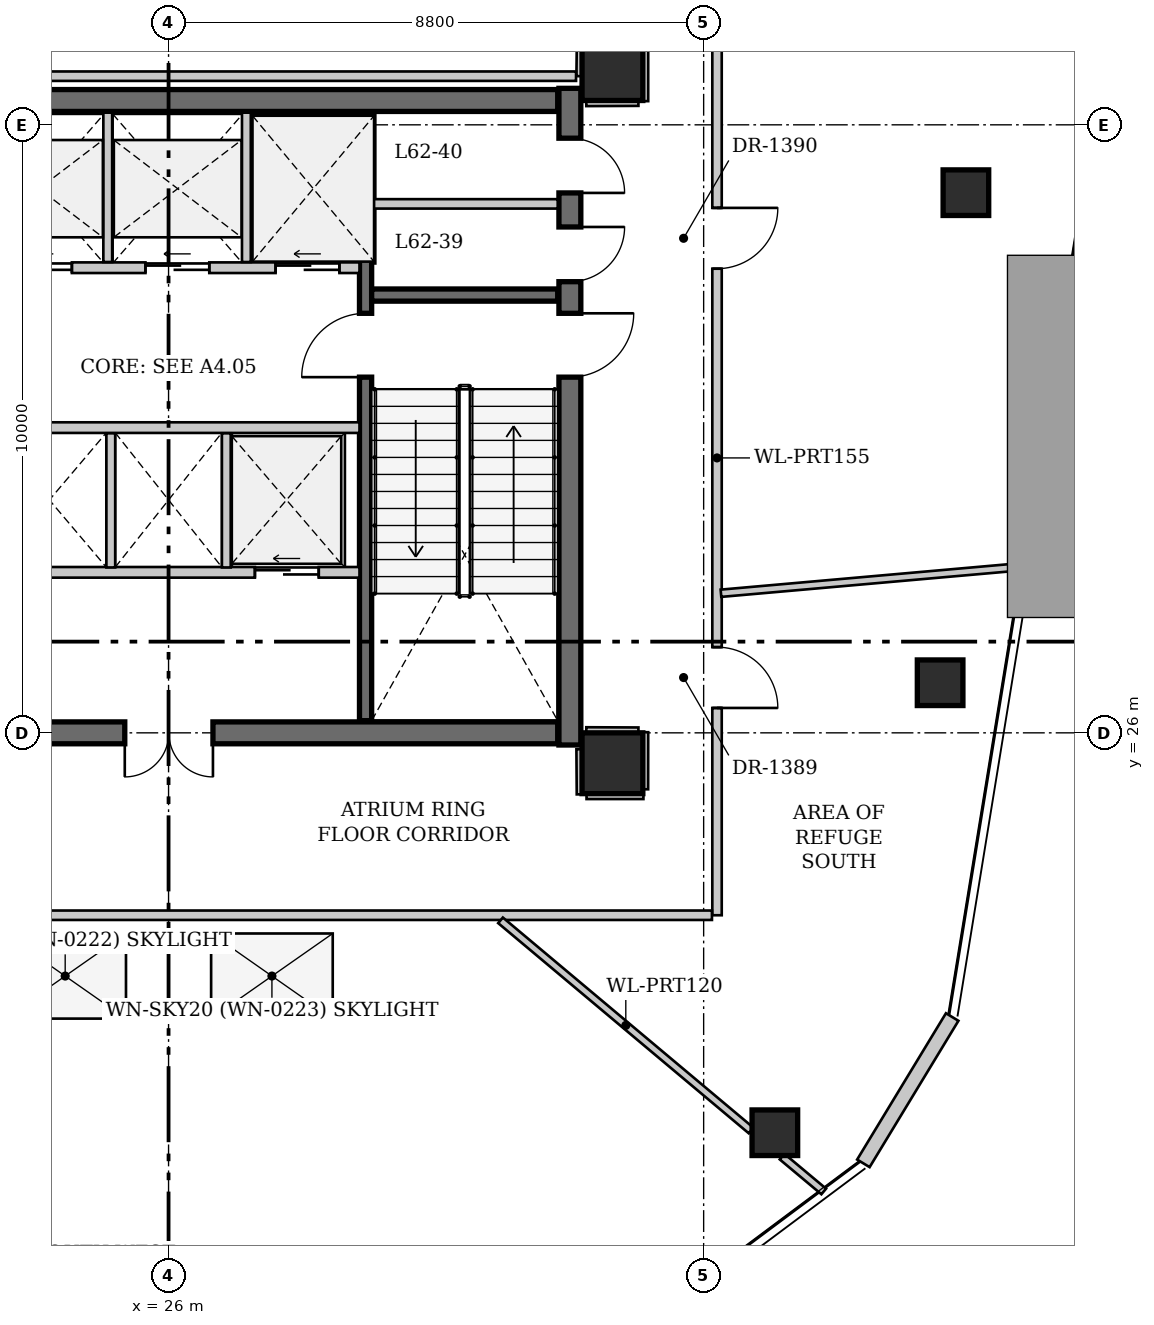
"""IFC4 building model, lengths in metres.
Left out: names, types, materials, properties, quantities, classifications, styles, units other than length and angle.
Written with IfcOpenShell. Run it as: python <this file> out.ifc"""

import sys

from ifc_helpers import new_model, si_unit, direction, frame, frame_2d, origin, origin_2d, place, context, subcontext, project, spatial, rectangle, hollow_rectangle, extrude, source, transform, mapped, element, fill, save


model = new_model("IFC4")
c1 = context("Model", 3, precision=1e-05, world=origin(), true_north=direction((0.0, 1.0)))
c2 = subcontext(c1, "Body", "Model", "MODEL_VIEW")
j1 = project(units=[si_unit("LENGTHUNIT", "METRE"), si_unit("PLANEANGLEUNIT", "RADIAN")], contexts=[c1])
p1 = place(None, origin())
s1 = spatial("IfcSite", under=j1, at=p1, CompositionType="ELEMENT")
p2 = place(p1, origin())
s2 = spatial("IfcBuilding", under=s1, at=p2, CompositionType="ELEMENT")
p3 = place(p2, frame((0.0, 0.0, 236.2)))
s3 = spatial("IfcBuildingStorey", under=s2, at=p3, CompositionType="ELEMENT", Elevation=236.2)
for number, where, z_axis, x_axis in (
    (1, (39.113, 34.884, 0.0), (0.0, 0.0, 1.0), (1.0, 0.0, 0.0)),
    (2, (38.689, 26.824, 0.0), (0.0, 0.0, 1.0), (1.0, 0.0, 0.0)),
    (3, (35.971, 19.423, 0.0), (0.0, 0.0, 1.0), (1.0, 0.0, 0.0)),
):
    element("IfcColumn", number, at=place(p3, frame(where, z_axis=z_axis, x_axis=x_axis)), inside=s3, PredefinedType="COLUMN", context=c2, shape_type="SweptSolid", body=[
        extrude(hollow_rectangle(XDim=0.75, YDim=0.75, WallThickness=0.04, at=origin_2d()), origin(), (0.0, 0.0, 1.0), 4.15),
    ])
for number, where, z_axis, x_axis in (
    (4, (33.3, 25.5, 0.0), (0.0, 0.0, 1.0), (1.0, 0.0, 0.0)),
    (5, (33.3, 36.9, 0.0), (0.0, 0.0, 1.0), (1.0, 0.0, 0.0)),
):
    element("IfcColumn", number, at=place(p3, frame(where, z_axis=z_axis, x_axis=x_axis)), inside=s3, PredefinedType="COLUMN", context=c2, shape_type="SweptSolid", body=[
        extrude(rectangle(XDim=1.0, YDim=1.0, at=origin_2d()), origin(), (0.0, 0.0, 1.0), 4.15),
    ])
p4 = place(p3, frame((38.887, 21.326, 0.0), z_axis=(0.0, 0.0, 1.0), x_axis=(-0.518774446732, -0.854911149429, 0.0)))
e6 = element("IfcWall", 6, at=p4, inside=s3, PredefinedType="SOLIDWALL", context=c2, shape_type="SweptSolid", body=[
    extrude(rectangle(XDim=2.815, YDim=0.24, at=frame_2d((1.408, 0.0))), origin(), (0.0, 0.0, 1.0), 4.15),
])
p5 = place(p3, frame((32.6, 36.6, 0.0), z_axis=(0.0, 0.0, 1.0), x_axis=(0.0, -1.0, 0.0)))
e7 = element("IfcWall", 7, at=p5, inside=s3, PredefinedType="SHEAR", context=c2, shape_type="SweptSolid", body=[
    extrude(rectangle(XDim=10.8, YDim=0.36, at=frame_2d((5.4, 0.0))), origin(), (0.0, 0.0, 1.0), 4.6),
])
p6 = place(p5, frame((3.7, 0.0, 0.0)))
e8 = element("IfcOpeningElement", 8, at=p6, cuts=e7, PredefinedType="OPENING", context=c2, shape_type="SweptSolid", body=[
    extrude(rectangle(XDim=1.05, YDim=2.15, at=frame_2d((0.525, 1.075))), frame((0.0, 0.19, 0.0), z_axis=(0.0, -1.0, 0.0), x_axis=(1.0, 0.0, 0.0)), (0.0, 0.0, 1.0), 0.38),
])
p7 = place(p5, frame((2.28, 0.0, 0.0)))
e9 = element("IfcOpeningElement", 9, at=p7, cuts=e7, PredefinedType="OPENING", context=c2, shape_type="SweptSolid", body=[
    extrude(rectangle(XDim=0.9, YDim=2.1, at=frame_2d((0.45, 1.05))), frame((0.0, 0.19, 0.0), z_axis=(0.0, -1.0, 0.0), x_axis=(1.0, 0.0, 0.0)), (0.0, 0.0, 1.0), 0.38),
])
p8 = place(p5, frame((0.82, 0.0, 0.0)))
e10 = element("IfcOpeningElement", 10, at=p8, cuts=e7, PredefinedType="OPENING", context=c2, shape_type="SweptSolid", body=[
    extrude(rectangle(XDim=0.9, YDim=2.1, at=frame_2d((0.45, 1.05))), frame((0.0, 0.19, 0.0), z_axis=(0.0, -1.0, 0.0), x_axis=(1.0, 0.0, 0.0)), (0.0, 0.0, 1.0), 0.38),
])
p9 = place(p3, frame((19.6, 36.4, 0.0), z_axis=(0.0, 0.0, 1.0), x_axis=(1.0, 0.0, 0.0)))
e11 = element("IfcWall", 11, at=p9, inside=s3, PredefinedType="SHEAR", context=c2, shape_type="SweptSolid", body=[
    extrude(rectangle(XDim=12.8, YDim=0.36, at=frame_2d((6.4, 0.0))), origin(), (0.0, 0.0, 1.0), 4.6),
])
p10 = place(p3, frame((32.4, 26.0, 0.0), z_axis=(0.0, 0.0, 1.0), x_axis=(-1.0, 0.0, 0.0)))
e12 = element("IfcWall", 12, at=p10, inside=s3, PredefinedType="SHEAR", context=c2, shape_type="SweptSolid", body=[
    extrude(rectangle(XDim=12.8, YDim=0.36, at=frame_2d((6.4, 0.0))), origin(), (0.0, 0.0, 1.0), 4.6),
])
p11 = place(p10, frame((10.75, 0.0, 0.0)))
e13 = element("IfcOpeningElement", 13, at=p11, cuts=e12, PredefinedType="OPENING", context=c2, shape_type="SweptSolid", body=[
    extrude(rectangle(XDim=1.05, YDim=2.15, at=frame_2d((0.525, 1.075))), frame((0.0, 0.19, 0.0), z_axis=(0.0, -1.0, 0.0), x_axis=(1.0, 0.0, 0.0)), (0.0, 0.0, 1.0), 0.38),
])
p12 = place(p10, frame((5.67, 0.0, 0.0)))
e14 = element("IfcOpeningElement", 14, at=p12, cuts=e12, PredefinedType="OPENING", context=c2, shape_type="SweptSolid", body=[
    extrude(rectangle(XDim=1.45, YDim=2.2, at=frame_2d((0.725, 1.1))), frame((0.0, 0.19, 0.0), z_axis=(0.0, -1.0, 0.0), x_axis=(1.0, 0.0, 0.0)), (0.0, 0.0, 1.0), 0.38),
])
p13 = place(p3, frame((29.24, 26.2, 0.0), z_axis=(0.0, 0.0, 1.0), x_axis=(0.0, 1.0, 0.0)))
e15 = element("IfcWall", 15, at=p13, inside=s3, PredefinedType="SHEAR", context=c2, shape_type="SweptSolid", body=[
    extrude(rectangle(XDim=10.0, YDim=0.2, at=frame_2d((5.0, 0.0))), origin(), (0.0, 0.0, 1.0), 4.6),
])
p14 = place(p13, frame((5.65, 0.0, 0.0)))
e16 = element("IfcOpeningElement", 16, at=p14, cuts=e15, PredefinedType="OPENING", context=c2, shape_type="SweptSolid", body=[
    extrude(rectangle(XDim=1.05, YDim=2.15, at=frame_2d((0.525, 1.075))), frame((0.0, 0.11, 0.0), z_axis=(0.0, -1.0, 0.0), x_axis=(1.0, 0.0, 0.0)), (0.0, 0.0, 1.0), 0.22),
])
p15 = place(p3, frame((29.34, 33.2, 0.0), z_axis=(0.0, 0.0, 1.0), x_axis=(1.0, 0.0, 0.0)))
e17 = element("IfcWall", 17, at=p15, inside=s3, PredefinedType="SHEAR", context=c2, shape_type="SweptSolid", body=[
    extrude(rectangle(XDim=3.06, YDim=0.2, at=frame_2d((1.53, 0.0))), origin(), (0.0, 0.0, 1.0), 4.6),
])
p16 = place(p3, frame((22.86, 33.65, 0.0), z_axis=(0.0, 0.0, 1.0), x_axis=(1.0, 0.0, 0.0)))
e18 = element("IfcWall", 18, at=p16, inside=s3, PredefinedType="SOLIDWALL", context=c2, shape_type="SweptSolid", body=[
    extrude(rectangle(XDim=6.28, YDim=0.175, at=frame_2d((3.14, 0.0))), origin(), (0.0, 0.0, 1.0), 4.15),
])
p17 = place(p16, frame((0.5, 0.0, 0.0)))
e19 = element("IfcOpeningElement", 19, at=p17, cuts=e18, PredefinedType="OPENING", context=c2, shape_type="SweptSolid", body=[
    extrude(rectangle(XDim=1.05, YDim=2.15, at=frame_2d((0.525, 1.075))), frame((0.0, 0.098, 0.0), z_axis=(0.0, -1.0, 0.0), x_axis=(1.0, 0.0, 0.0)), (0.0, 0.0, 1.0), 0.195),
])
p18 = place(p16, frame((2.76, 0.0, 0.0)))
e20 = element("IfcOpeningElement", 20, at=p18, cuts=e18, PredefinedType="OPENING", context=c2, shape_type="SweptSolid", body=[
    extrude(rectangle(XDim=1.05, YDim=2.15, at=frame_2d((0.525, 1.075))), frame((0.0, 0.098, 0.0), z_axis=(0.0, -1.0, 0.0), x_axis=(1.0, 0.0, 0.0)), (0.0, 0.0, 1.0), 0.195),
])
p19 = place(p16, frame((4.9, 0.0, 0.0)))
e21 = element("IfcOpeningElement", 21, at=p19, cuts=e18, PredefinedType="OPENING", context=c2, shape_type="SweptSolid", body=[
    extrude(rectangle(XDim=1.05, YDim=2.15, at=frame_2d((0.525, 1.075))), frame((0.0, 0.098, 0.0), z_axis=(0.0, -1.0, 0.0), x_axis=(1.0, 0.0, 0.0)), (0.0, 0.0, 1.0), 0.195),
])
for number, where, z_axis, x_axis in (
    (22, (25.0, 33.743, 0.0), (0.0, 0.0, 1.0), (0.0, 1.0, 0.0)),
    (23, (27.28, 33.743, 0.0), (0.0, 0.0, 1.0), (0.0, 1.0, 0.0)),
):
    element("IfcWall", number, at=place(p3, frame(where, z_axis=z_axis, x_axis=x_axis)), inside=s3, PredefinedType="SOLIDWALL", context=c2, shape_type="SweptSolid", body=[
        extrude(rectangle(XDim=2.457, YDim=0.145, at=frame_2d((1.228, 0.0))), origin(), (0.0, 0.0, 1.0), 4.15),
    ])
p20 = place(p3, frame((22.86, 31.02, 0.0), z_axis=(0.0, 0.0, 1.0), x_axis=(1.0, 0.0, 0.0)))
e24 = element("IfcWall", 24, at=p20, inside=s3, PredefinedType="SOLIDWALL", context=c2, shape_type="SweptSolid", body=[
    extrude(rectangle(XDim=6.28, YDim=0.175, at=frame_2d((3.14, 0.0))), origin(), (0.0, 0.0, 1.0), 4.15),
])
p21 = place(p3, frame((22.86, 28.64, 0.0), z_axis=(0.0, 0.0, 1.0), x_axis=(1.0, 0.0, 0.0)))
e25 = element("IfcWall", 25, at=p21, inside=s3, PredefinedType="SOLIDWALL", context=c2, shape_type="SweptSolid", body=[
    extrude(rectangle(XDim=6.28, YDim=0.175, at=frame_2d((3.14, 0.0))), origin(), (0.0, 0.0, 1.0), 4.15),
])
p22 = place(p21, frame((4.56, 0.0, 0.0)))
e26 = element("IfcOpeningElement", 26, at=p22, cuts=e25, PredefinedType="OPENING", context=c2, shape_type="SweptSolid", body=[
    extrude(rectangle(XDim=1.05, YDim=2.15, at=frame_2d((0.525, 1.075))), frame((0.0, 0.098, 0.0), z_axis=(0.0, -1.0, 0.0), x_axis=(1.0, 0.0, 0.0)), (0.0, 0.0, 1.0), 0.195),
])
for number, where, z_axis, x_axis in (
    (27, (25.05, 28.72, 0.0), (0.0, 0.0, 1.0), (0.0, 1.0, 0.0)),
    (28, (26.95, 28.72, 0.0), (0.0, 0.0, 1.0), (0.0, 1.0, 0.0)),
):
    element("IfcWall", number, at=place(p3, frame(where, z_axis=z_axis, x_axis=x_axis)), inside=s3, PredefinedType="SOLIDWALL", context=c2, shape_type="SweptSolid", body=[
        extrude(rectangle(XDim=2.207, YDim=0.145, at=frame_2d((1.103, 0.0))), origin(), (0.0, 0.0, 1.0), 4.15),
    ])
p23 = place(p3, frame((29.34, 34.7, 0.0), z_axis=(0.0, 0.0, 1.0), x_axis=(1.0, 0.0, 0.0)))
e29 = element("IfcWall", 29, at=p23, inside=s3, PredefinedType="PARTITIONING", context=c2, shape_type="SweptSolid", body=[
    extrude(rectangle(XDim=3.06, YDim=0.155, at=frame_2d((1.53, 0.0))), origin(), (0.0, 0.0, 1.0), 4.15),
])
p24 = place(p3, frame((35.02, 39.116, 0.0), z_axis=(0.0, 0.0, 1.0), x_axis=(0.0, -1.0, 0.0)))
e30 = element("IfcWall", 30, at=p24, inside=s3, PredefinedType="PARTITIONING", context=c2, shape_type="SweptSolid", body=[
    extrude(rectangle(XDim=16.116, YDim=0.155, at=frame_2d((8.058, 0.0))), origin(), (0.0, 0.0, 1.0), 4.15),
])
p25 = place(p24, frame((11.707, 0.0, 0.0)))
e31 = element("IfcOpeningElement", 31, at=p25, cuts=e30, PredefinedType="OPENING", context=c2, shape_type="SweptSolid", body=[
    extrude(rectangle(XDim=1.0, YDim=2.15, at=frame_2d((0.5, 1.075))), frame((0.0, 0.087, 0.0), z_axis=(0.0, -1.0, 0.0), x_axis=(1.0, 0.0, 0.0)), (0.0, 0.0, 1.0), 0.175),
])
p26 = place(p24, frame((4.483, 0.0, 0.0)))
e32 = element("IfcOpeningElement", 32, at=p26, cuts=e30, PredefinedType="OPENING", context=c2, shape_type="SweptSolid", body=[
    extrude(rectangle(XDim=1.0, YDim=2.15, at=frame_2d((0.5, 1.075))), frame((0.0, 0.087, 0.0), z_axis=(0.0, -1.0, 0.0), x_axis=(1.0, 0.0, 0.0)), (0.0, 0.0, 1.0), 0.175),
])
p27 = place(p3, frame((34.937, 23.0, 0.0), z_axis=(0.0, 0.0, 1.0), x_axis=(-1.0, 0.0, 0.0)))
e33 = element("IfcWall", 33, at=p27, inside=s3, PredefinedType="PARTITIONING", context=c2, shape_type="SweptSolid", body=[
    extrude(rectangle(XDim=19.737, YDim=0.155, at=frame_2d((9.868, 0.0))), origin(), (0.0, 0.0, 1.0), 4.15),
])
p28 = place(p27, frame((15.633, 0.0, 0.0)))
e34 = element("IfcOpeningElement", 34, at=p28, cuts=e33, PredefinedType="OPENING", context=c2, shape_type="SweptSolid", body=[
    extrude(rectangle(XDim=1.0, YDim=2.15, at=frame_2d((0.5, 1.075))), frame((0.0, 0.087, 0.0), z_axis=(0.0, -1.0, 0.0), x_axis=(1.0, 0.0, 0.0)), (0.0, 0.0, 1.0), 0.175),
])
p29 = place(p3, frame((33.811, 36.389, 0.0), z_axis=(0.0, 0.0, 1.0), x_axis=(0.0, 1.0, 0.0)))
e35 = element("IfcWall", 35, at=p29, inside=s3, PredefinedType="PARTITIONING", context=c2, shape_type="SweptSolid", body=[
    extrude(rectangle(XDim=1.021, YDim=0.155, at=frame_2d((0.511, 0.0))), origin(), (0.0, 0.0, 1.0), 4.15),
])
p30 = place(p3, frame((32.792, 37.33, 0.0), z_axis=(0.0, 0.0, 1.0), x_axis=(-0.012908099233, -0.999916687017, 0.0)))
e36 = element("IfcWall", 36, at=p30, inside=s3, PredefinedType="PARTITIONING", context=c2, shape_type="SweptSolid", body=[
    extrude(rectangle(XDim=0.53, YDim=0.155, at=frame_2d((0.265, 0.0))), origin(), (0.0, 0.0, 1.0), 4.15),
])
p31 = place(p3, frame((32.701, 36.8, 0.0), z_axis=(0.0, 0.0, 1.0), x_axis=(-1.0, 0.0, 0.0)))
e37 = element("IfcWall", 37, at=p31, inside=s3, PredefinedType="PARTITIONING", context=c2, shape_type="SweptSolid", body=[
    extrude(rectangle(XDim=13.486, YDim=0.155, at=frame_2d((6.743, 0.0))), origin(), (0.0, 0.0, 1.0), 3.509),
])
p32 = place(p3, frame((32.785, 25.73, 0.0), z_axis=(0.0, 0.0, 1.0), x_axis=(0.007570553288, -0.999971342951, 0.0)))
e38 = element("IfcWall", 38, at=p32, inside=s3, PredefinedType="PARTITIONING", context=c2, shape_type="SweptSolid", body=[
    extrude(rectangle(XDim=0.742, YDim=0.155, at=frame_2d((0.371, 0.0))), origin(), (0.0, 0.0, 1.0), 2.725),
])
p33 = place(p3, frame((32.874, 24.988, 0.0), z_axis=(0.0, 0.0, 1.0), x_axis=(1.0, 0.0, 0.0)))
e39 = element("IfcWall", 39, at=p33, inside=s3, PredefinedType="PARTITIONING", context=c2, shape_type="SweptSolid", body=[
    extrude(rectangle(XDim=0.936, YDim=0.155, at=frame_2d((0.468, 0.0))), origin(), (0.0, 0.0, 1.0), 2.725),
])
p34 = place(p3, frame((33.81, 25.072, 0.0), z_axis=(0.0, 0.0, 1.0), x_axis=(0.001040582163, 0.999999458594, 0.0)))
e40 = element("IfcWall", 40, at=p34, inside=s3, PredefinedType="PARTITIONING", context=c2, shape_type="SweptSolid", body=[
    extrude(rectangle(XDim=0.938, YDim=0.155, at=frame_2d((0.469, 0.0))), origin(), (0.0, 0.0, 1.0), 2.725),
])
p35 = place(p3, frame((33.727, 26.011, 0.0), z_axis=(0.0, 0.0, 1.0), x_axis=(-0.999990868706, 0.004273465251, 0.0)))
e41 = element("IfcWall", 41, at=p35, inside=s3, PredefinedType="PARTITIONING", context=c2, shape_type="SweptSolid", body=[
    extrude(rectangle(XDim=0.857, YDim=0.155, at=frame_2d((0.428, 0.0))), origin(), (0.0, 0.0, 1.0), 2.725),
])
p36 = place(p3, frame((32.87, 36.385, 0.0), z_axis=(0.0, 0.0, 1.0), x_axis=(0.999990868706, 0.004273465251, 0.0)))
e42 = element("IfcWall", 42, at=p36, inside=s3, PredefinedType="PARTITIONING", context=c2, shape_type="SweptSolid", body=[
    extrude(rectangle(XDim=0.857, YDim=0.155, at=frame_2d((0.428, 0.0))), origin(), (0.0, 0.0, 1.0), 4.15),
])
p37 = place(p3, frame((31.459, 22.917, 0.0), z_axis=(0.0, 0.0, 1.0), x_axis=(0.766141073416, -0.6426724326, 0.0)))
e43 = element("IfcWall", 43, at=p37, inside=s3, PredefinedType="PARTITIONING", context=c2, shape_type="SweptSolid", body=[
    extrude(rectangle(XDim=5.378, YDim=0.12, at=frame_2d((2.689, 0.0))), origin(), (0.0, 0.0, 1.0), 4.15),
])
p38 = place(p3, frame((36.09, 19.03, 0.0), z_axis=(0.0, 0.0, 1.0), x_axis=(0.767076870152, -0.641555200491, 0.0)))
e44 = element("IfcWall", 44, at=p38, inside=s3, PredefinedType="PARTITIONING", context=c2, shape_type="SweptSolid", body=[
    extrude(rectangle(XDim=0.893, YDim=0.12, at=frame_2d((0.446, 0.0))), origin(), (0.0, 0.0, 1.0), 4.15),
])
p39 = place(p3, frame((35.085, 28.296, 0.0), z_axis=(0.0, 0.0, 1.0), x_axis=(0.996123949787, 0.087960654047, 0.0)))
e45 = element("IfcWall", 45, at=p39, inside=s3, PredefinedType="PARTITIONING", context=c2, shape_type="SweptSolid", body=[
    extrude(rectangle(XDim=5.01, YDim=0.12, at=frame_2d((2.505, 0.0))), origin(), (0.0, 0.0, 1.0), 4.15),
])
p40 = place(p3, frame((0.0, 0.0, -0.35)))
p41 = place(p40, frame((24.3, 22.0, 0.3)))
e46 = element("IfcWindow", 46, at=p41, inside=s3, PartitioningType="SINGLE_PANEL", PredefinedType="SKYLIGHT", context=c2, shape_type="SweptSolid", body=[
    extrude(rectangle(XDim=2.0, YDim=1.4, at=origin_2d()), origin(), (0.0, 0.0, 1.0), 0.05),
])
p42 = place(p40, frame((27.7, 22.0, 0.3)))
e47 = element("IfcWindow", 47, at=p42, inside=s3, PartitioningType="SINGLE_PANEL", PredefinedType="SKYLIGHT", context=c2, shape_type="SweptSolid", body=[
    extrude(rectangle(XDim=2.0, YDim=1.4, at=origin_2d()), origin(), (0.0, 0.0, 1.0), 0.05),
])
m1 = source(origin(), c2, "Body", "SweptSolid", [
    extrude(rectangle(XDim=1.45, YDim=2.2, at=frame_2d((0.725, 1.1))), frame((0.0, 0.025, 0.0), z_axis=(0.0, -1.0, 0.0), x_axis=(1.0, 0.0, 0.0)), (0.0, 0.0, 1.0), 0.05),
])
p43 = place(p12, origin())
e48 = element("IfcDoor", 48, at=p43, inside=s3, OperationType="DOUBLE_DOOR_SINGLE_SWING", PredefinedType="DOOR", context=c2, shape_type="MappedRepresentation", body=[
    mapped(m1, transform((0.0, 0.0, 0.0), x_axis=(1.0, 0.0, 0.0), y_axis=(0.0, 1.0, 0.0), z_axis=(0.0, 0.0, 1.0), scale=1.0)),
])
fill(e14, e48)
m2 = source(origin(), c2, "Body", "SweptSolid", [
    extrude(rectangle(XDim=1.05, YDim=2.15, at=frame_2d((0.525, 1.075))), frame((0.0, 0.025, 0.0), z_axis=(0.0, -1.0, 0.0), x_axis=(1.0, 0.0, 0.0)), (0.0, 0.0, 1.0), 0.05),
])
p44 = place(p6, origin())
e49 = element("IfcDoor", 49, at=p44, inside=s3, OperationType="SINGLE_SWING_LEFT", PredefinedType="DOOR", context=c2, shape_type="MappedRepresentation", body=[
    mapped(m2, transform((0.0, 0.0, 0.0), x_axis=(1.0, 0.0, 0.0), y_axis=(0.0, 1.0, 0.0), z_axis=(0.0, 0.0, 1.0), scale=1.0)),
])
fill(e8, e49)
p45 = place(p14, origin())
e50 = element("IfcDoor", 50, at=p45, inside=s3, OperationType="SINGLE_SWING_LEFT", PredefinedType="DOOR", context=c2, shape_type="MappedRepresentation", body=[
    mapped(m2, transform((0.0, 0.0, 0.0), x_axis=(1.0, 0.0, 0.0), y_axis=(0.0, 1.0, 0.0), z_axis=(0.0, 0.0, 1.0), scale=1.0)),
])
fill(e16, e50)
m3 = source(origin(), c2, "Body", "SweptSolid", [
    extrude(rectangle(XDim=1.05, YDim=2.15, at=frame_2d((0.525, 1.075))), frame((0.0, 0.025, 0.0), z_axis=(0.0, -1.0, 0.0), x_axis=(1.0, 0.0, 0.0)), (0.0, 0.0, 1.0), 0.05),
])
p46 = place(p17, origin())
e51 = element("IfcDoor", 51, at=p46, inside=s3, OperationType="SLIDING_TO_LEFT", PredefinedType="DOOR", context=c2, shape_type="MappedRepresentation", body=[
    mapped(m3, transform((0.0, 0.0, 0.0), x_axis=(1.0, 0.0, 0.0), y_axis=(0.0, 1.0, 0.0), z_axis=(0.0, 0.0, 1.0), scale=1.0)),
])
fill(e19, e51)
p47 = place(p18, origin())
e52 = element("IfcDoor", 52, at=p47, inside=s3, OperationType="SLIDING_TO_LEFT", PredefinedType="DOOR", context=c2, shape_type="MappedRepresentation", body=[
    mapped(m3, transform((0.0, 0.0, 0.0), x_axis=(1.0, 0.0, 0.0), y_axis=(0.0, 1.0, 0.0), z_axis=(0.0, 0.0, 1.0), scale=1.0)),
])
fill(e20, e52)
p48 = place(p19, origin())
e53 = element("IfcDoor", 53, at=p48, inside=s3, OperationType="SLIDING_TO_LEFT", PredefinedType="DOOR", context=c2, shape_type="MappedRepresentation", body=[
    mapped(m3, transform((0.0, 0.0, 0.0), x_axis=(1.0, 0.0, 0.0), y_axis=(0.0, 1.0, 0.0), z_axis=(0.0, 0.0, 1.0), scale=1.0)),
])
fill(e21, e53)
p49 = place(p22, origin())
e54 = element("IfcDoor", 54, at=p49, inside=s3, OperationType="SLIDING_TO_LEFT", PredefinedType="DOOR", context=c2, shape_type="MappedRepresentation", body=[
    mapped(m3, transform((0.0, 0.0, 0.0), x_axis=(1.0, 0.0, 0.0), y_axis=(0.0, 1.0, 0.0), z_axis=(0.0, 0.0, 1.0), scale=1.0)),
])
fill(e26, e54)
m4 = source(origin(), c2, "Body", "SweptSolid", [
    extrude(rectangle(XDim=0.9, YDim=2.1, at=frame_2d((0.45, 1.05))), frame((0.0, 0.025, 0.0), z_axis=(0.0, -1.0, 0.0), x_axis=(1.0, 0.0, 0.0)), (0.0, 0.0, 1.0), 0.05),
])
p50 = place(p7, origin())
e55 = element("IfcDoor", 55, at=p50, inside=s3, OperationType="SINGLE_SWING_LEFT", PredefinedType="DOOR", context=c2, shape_type="MappedRepresentation", body=[
    mapped(m4, transform((0.0, 0.0, 0.0), x_axis=(1.0, 0.0, 0.0), y_axis=(0.0, 1.0, 0.0), z_axis=(0.0, 0.0, 1.0), scale=1.0)),
])
fill(e9, e55)
p51 = place(p8, origin())
e56 = element("IfcDoor", 56, at=p51, inside=s3, OperationType="SINGLE_SWING_RIGHT", PredefinedType="DOOR", context=c2, shape_type="MappedRepresentation", body=[
    mapped(m4, transform((0.0, 0.0, 0.0), x_axis=(1.0, 0.0, 0.0), y_axis=(0.0, 1.0, 0.0), z_axis=(0.0, 0.0, 1.0), scale=1.0)),
])
fill(e10, e56)
m5 = source(origin(), c2, "Body", "SweptSolid", [
    extrude(rectangle(XDim=1.0, YDim=2.15, at=frame_2d((0.5, 1.075))), frame((0.0, 0.025, 0.0), z_axis=(0.0, -1.0, 0.0), x_axis=(1.0, 0.0, 0.0)), (0.0, 0.0, 1.0), 0.05),
])
p52 = place(p25, origin())
e57 = element("IfcDoor", 57, at=p52, inside=s3, OperationType="SINGLE_SWING_RIGHT", PredefinedType="DOOR", context=c2, shape_type="MappedRepresentation", body=[
    mapped(m5, transform((0.0, 0.0, 0.0), x_axis=(1.0, 0.0, 0.0), y_axis=(0.0, 1.0, 0.0), z_axis=(0.0, 0.0, 1.0), scale=1.0)),
])
fill(e31, e57)
p53 = place(p26, origin())
e58 = element("IfcDoor", 58, at=p53, inside=s3, OperationType="SINGLE_SWING_LEFT", PredefinedType="DOOR", context=c2, shape_type="MappedRepresentation", body=[
    mapped(m5, transform((0.0, 0.0, 0.0), x_axis=(1.0, 0.0, 0.0), y_axis=(0.0, 1.0, 0.0), z_axis=(0.0, 0.0, 1.0), scale=1.0)),
])
fill(e32, e58)
save(model, sys.argv[1])
